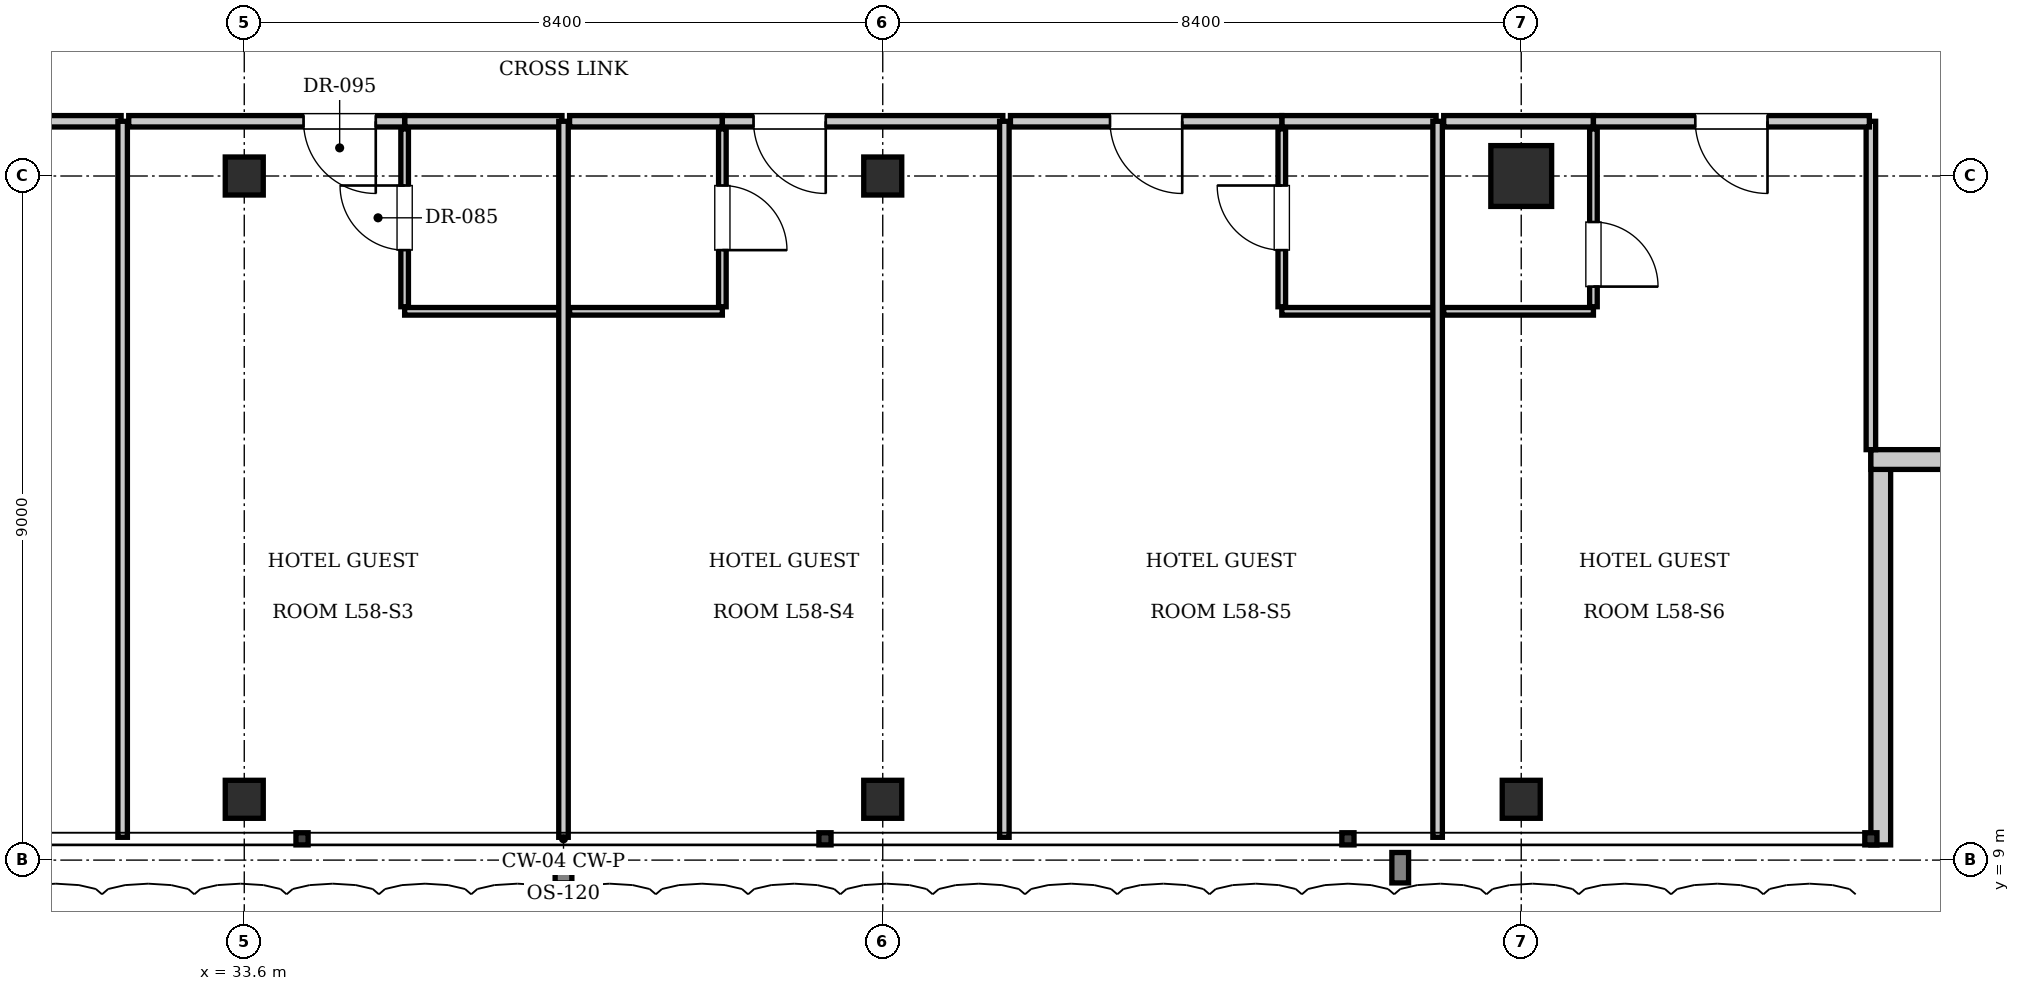
"""IFC4 building model, lengths in metres.
Left out: names, types, materials, properties, quantities, classifications, styles, units other than length and angle.
Written with IfcOpenShell. Run it as: python <this file> out.ifc"""

import sys

from ifc_helpers import new_model, si_unit, direction, frame, frame_2d, origin, origin_2d, place, context, subcontext, project, spatial, rectangle, i_section, extrude, element, fill, save


model = new_model("IFC4")
c1 = context("Model", 3, precision=1e-05, world=origin(), true_north=direction((0.0, 1.0)))
c2 = subcontext(c1, "Body", "Model", "MODEL_VIEW")
j1 = project(units=[si_unit("LENGTHUNIT", "METRE"), si_unit("PLANEANGLEUNIT", "RADIAN")], contexts=[c1])
p1 = place(None, origin())
s1 = spatial("IfcSite", under=j1, at=p1, CompositionType="ELEMENT")
p2 = place(p1, origin())
s2 = spatial("IfcBuilding", under=s1, at=p2, CompositionType="ELEMENT")
p3 = place(p2, frame((0.0, 0.0, 239.4)))
s3 = spatial("IfcBuildingStorey", under=s2, at=p3, CompositionType="ELEMENT", Elevation=239.4)
p4 = place(p3, frame((50.4, 18.0, 0.0), z_axis=(0.0, 0.0, 1.0), x_axis=(1.0, 0.0, 0.0)))
e1 = element("IfcColumn", 1, at=p4, inside=s3, PredefinedType="COLUMN", context=c2, shape_type="SweptSolid", body=[
    extrude(rectangle(XDim=0.8, YDim=0.8, at=origin_2d()), origin(), (0.0, 0.0, 1.0), 3.85),
])
for number, where, z_axis, x_axis in (
    (2, (33.6, 18.0, 0.0), (0.0, 0.0, 1.0), (1.0, 0.0, 0.0)),
    (3, (42.0, 18.0, 0.0), (0.0, 0.0, 1.0), (1.0, 0.0, 0.0)),
    (4, (33.6, 9.8, 0.0), (0.0, 0.0, 1.0), (1.0, 0.0, 0.0)),
    (5, (42.0, 9.8, 0.0), (0.0, 0.0, 1.0), (1.0, 0.0, 0.0)),
    (6, (50.4, 9.8, 0.0), (0.0, 0.0, 1.0), (1.0, 0.0, 0.0)),
):
    element("IfcColumn", number, at=place(p3, frame(where, z_axis=z_axis, x_axis=x_axis)), inside=s3, PredefinedType="COLUMN", context=c2, shape_type="SweptSolid", body=[
        extrude(i_section(OverallWidth=0.5, OverallDepth=0.5, WebThickness=0.022, FlangeThickness=0.032, at=origin_2d()), origin(), (0.0, 0.0, 1.0), 3.85),
    ])
p5 = place(p3, frame((55.13, 14.4, 0.0), z_axis=(0.0, 0.0, 1.0), x_axis=(0.0, -1.0, 0.0)))
e7 = element("IfcWall", 7, at=p5, inside=s3, PredefinedType="SOLIDWALL", context=c2, shape_type="SweptSolid", body=[
    extrude(rectangle(XDim=5.2, YDim=0.26, at=frame_2d((2.6, 0.0))), origin(), (0.0, 0.0, 1.0), 3.61),
])
p6 = place(p3, frame((60.2, 14.27, 0.0), z_axis=(0.0, 0.0, 1.0), x_axis=(-1.0, 0.0, 0.0)))
e8 = element("IfcWall", 8, at=p6, inside=s3, PredefinedType="SOLIDWALL", context=c2, shape_type="SweptSolid", body=[
    extrude(rectangle(XDim=5.2, YDim=0.26, at=frame_2d((2.6, 0.0))), origin(), (0.0, 0.0, 1.0), 3.61),
])
p7 = place(p6, frame((1.6, 0.0, 0.9)))
e9 = element("IfcOpeningElement", 9, at=p7, cuts=e8, PredefinedType="OPENING", context=c2, shape_type="SweptSolid", body=[
    extrude(rectangle(XDim=2.0, YDim=2.2, at=frame_2d((1.0, 1.1))), frame((0.0, 0.14, 0.0), z_axis=(0.0, -1.0, 0.0), x_axis=(1.0, 0.0, 0.0)), (0.0, 0.0, 1.0), 0.28),
])
p8 = place(p3, frame((55.0, 14.4, 0.0), z_axis=(0.0, 0.0, 1.0), x_axis=(0.0, 1.0, 0.0)))
e10 = element("IfcWall", 10, at=p8, inside=s3, PredefinedType="PARTITIONING", context=c2, shape_type="SweptSolid", body=[
    extrude(rectangle(XDim=4.32, YDim=0.125, at=frame_2d((2.16, 0.0))), origin(), (0.0, 0.0, 1.0), 3.61),
])
p9 = place(p3, frame((28.35, 18.72, 0.0), z_axis=(0.0, 0.0, 1.0), x_axis=(1.0, 0.0, 0.0)))
e11 = element("IfcWall", 11, at=p9, inside=s3, PredefinedType="PARTITIONING", context=c2, shape_type="SweptSolid", body=[
    extrude(rectangle(XDim=3.63, YDim=0.15, at=frame_2d((1.815, 0.0))), origin(), (0.0, 0.0, 1.0), 3.61),
])
p10 = place(p9, frame((1.34, 0.0, 0.0)))
e12 = element("IfcOpeningElement", 12, at=p10, cuts=e11, PredefinedType="OPENING", context=c2, shape_type="SweptSolid", body=[
    extrude(rectangle(XDim=0.95, YDim=2.15, at=frame_2d((0.475, 1.075))), frame((0.0, 0.085, 0.0), z_axis=(0.0, -1.0, 0.0), x_axis=(1.0, 0.0, 0.0)), (0.0, 0.0, 1.0), 0.17),
])
p11 = place(p3, frame((32.0, 9.3, 0.0), z_axis=(0.0, 0.0, 1.0), x_axis=(0.0, 1.0, 0.0)))
e13 = element("IfcWall", 13, at=p11, inside=s3, PredefinedType="PARTITIONING", context=c2, shape_type="SweptSolid", body=[
    extrude(rectangle(XDim=9.42, YDim=0.125, at=frame_2d((4.71, 0.0))), origin(), (0.0, 0.0, 1.0), 3.61),
])
p12 = place(p3, frame((35.71, 18.72, 0.0), z_axis=(0.0, 0.0, 1.0), x_axis=(1.0, 0.0, 0.0)))
e14 = element("IfcWall", 14, at=p12, inside=s3, PredefinedType="PARTITIONING", context=c2, shape_type="SweptSolid", body=[
    extrude(rectangle(XDim=2.07, YDim=0.15, at=frame_2d((1.035, 0.0))), origin(), (0.0, 0.0, 1.0), 3.61),
])
p13 = place(p3, frame((35.71, 16.22, 0.0), z_axis=(0.0, 0.0, 1.0), x_axis=(1.0, 0.0, 0.0)))
e15 = element("IfcWall", 15, at=p13, inside=s3, PredefinedType="PARTITIONING", context=c2, shape_type="SweptSolid", body=[
    extrude(rectangle(XDim=2.05, YDim=0.1, at=frame_2d((1.025, 0.0))), origin(), (0.0, 0.0, 1.0), 3.61),
])
p14 = place(p3, frame((35.71, 16.28, 0.0), z_axis=(0.0, 0.0, 1.0), x_axis=(0.0, 1.0, 0.0)))
e16 = element("IfcWall", 16, at=p14, inside=s3, PredefinedType="PARTITIONING", context=c2, shape_type="SweptSolid", body=[
    extrude(rectangle(XDim=2.34, YDim=0.1, at=frame_2d((1.17, 0.0))), origin(), (0.0, 0.0, 1.0), 3.61),
])
p15 = place(p14, frame((0.745, 0.0, 0.0)))
e17 = element("IfcOpeningElement", 17, at=p15, cuts=e16, PredefinedType="OPENING", context=c2, shape_type="SweptSolid", body=[
    extrude(rectangle(XDim=0.85, YDim=2.1, at=frame_2d((0.425, 1.05))), frame((0.0, 0.06, 0.0), z_axis=(0.0, -1.0, 0.0), x_axis=(1.0, 0.0, 0.0)), (0.0, 0.0, 1.0), 0.12),
])
p16 = place(p3, frame((32.08, 18.72, 0.0), z_axis=(0.0, 0.0, 1.0), x_axis=(1.0, 0.0, 0.0)))
e18 = element("IfcWall", 18, at=p16, inside=s3, PredefinedType="PARTITIONING", context=c2, shape_type="SweptSolid", body=[
    extrude(rectangle(XDim=3.63, YDim=0.15, at=frame_2d((1.815, 0.0))), origin(), (0.0, 0.0, 1.0), 3.61),
])
p17 = place(p16, frame((2.3, 0.0, 0.0)))
e19 = element("IfcOpeningElement", 19, at=p17, cuts=e18, PredefinedType="OPENING", context=c2, shape_type="SweptSolid", body=[
    extrude(rectangle(XDim=0.95, YDim=2.15, at=frame_2d((0.475, 1.075))), frame((0.0, 0.085, 0.0), z_axis=(0.0, -1.0, 0.0), x_axis=(1.0, 0.0, 0.0)), (0.0, 0.0, 1.0), 0.17),
])
p18 = place(p3, frame((37.8, 9.3, 0.0), z_axis=(0.0, 0.0, 1.0), x_axis=(0.0, 1.0, 0.0)))
e20 = element("IfcWall", 20, at=p18, inside=s3, PredefinedType="PARTITIONING", context=c2, shape_type="SweptSolid", body=[
    extrude(rectangle(XDim=9.42, YDim=0.125, at=frame_2d((4.71, 0.0))), origin(), (0.0, 0.0, 1.0), 3.293),
])
p19 = place(p3, frame((37.88, 18.72, 0.0), z_axis=(0.0, 0.0, 1.0), x_axis=(1.0, 0.0, 0.0)))
e21 = element("IfcWall", 21, at=p19, inside=s3, PredefinedType="PARTITIONING", context=c2, shape_type="SweptSolid", body=[
    extrude(rectangle(XDim=2.01, YDim=0.15, at=frame_2d((1.005, 0.0))), origin(), (0.0, 0.0, 1.0), 3.61),
])
p20 = place(p3, frame((37.88, 16.22, 0.0), z_axis=(0.0, 0.0, 1.0), x_axis=(1.0, 0.0, 0.0)))
e22 = element("IfcWall", 22, at=p20, inside=s3, PredefinedType="PARTITIONING", context=c2, shape_type="SweptSolid", body=[
    extrude(rectangle(XDim=2.01, YDim=0.1, at=frame_2d((1.005, 0.0))), origin(), (0.0, 0.0, 1.0), 3.61),
])
p21 = place(p3, frame((39.89, 16.28, 0.0), z_axis=(0.0, 0.0, 1.0), x_axis=(0.0, 1.0, 0.0)))
e23 = element("IfcWall", 23, at=p21, inside=s3, PredefinedType="PARTITIONING", context=c2, shape_type="SweptSolid", body=[
    extrude(rectangle(XDim=2.34, YDim=0.1, at=frame_2d((1.17, 0.0))), origin(), (0.0, 0.0, 1.0), 3.61),
])
p22 = place(p21, frame((0.745, 0.0, 0.0)))
e24 = element("IfcOpeningElement", 24, at=p22, cuts=e23, PredefinedType="OPENING", context=c2, shape_type="SweptSolid", body=[
    extrude(rectangle(XDim=0.85, YDim=2.1, at=frame_2d((0.425, 1.05))), frame((0.0, 0.06, 0.0), z_axis=(0.0, -1.0, 0.0), x_axis=(1.0, 0.0, 0.0)), (0.0, 0.0, 1.0), 0.12),
])
p23 = place(p3, frame((39.89, 18.72, 0.0), z_axis=(0.0, 0.0, 1.0), x_axis=(1.0, 0.0, 0.0)))
e25 = element("IfcWall", 25, at=p23, inside=s3, PredefinedType="PARTITIONING", context=c2, shape_type="SweptSolid", body=[
    extrude(rectangle(XDim=3.69, YDim=0.15, at=frame_2d((1.845, 0.0))), origin(), (0.0, 0.0, 1.0), 3.61),
])
p24 = place(p23, frame((0.41, 0.0, 0.0)))
e26 = element("IfcOpeningElement", 26, at=p24, cuts=e25, PredefinedType="OPENING", context=c2, shape_type="SweptSolid", body=[
    extrude(rectangle(XDim=0.95, YDim=2.15, at=frame_2d((0.475, 1.075))), frame((0.0, 0.085, 0.0), z_axis=(0.0, -1.0, 0.0), x_axis=(1.0, 0.0, 0.0)), (0.0, 0.0, 1.0), 0.17),
])
p25 = place(p3, frame((43.6, 9.3, 0.0), z_axis=(0.0, 0.0, 1.0), x_axis=(0.0, 1.0, 0.0)))
e27 = element("IfcWall", 27, at=p25, inside=s3, PredefinedType="PARTITIONING", context=c2, shape_type="SweptSolid", body=[
    extrude(rectangle(XDim=9.42, YDim=0.125, at=frame_2d((4.71, 0.0))), origin(), (0.0, 0.0, 1.0), 3.61),
])
p26 = place(p3, frame((47.25, 18.72, 0.0), z_axis=(0.0, 0.0, 1.0), x_axis=(1.0, 0.0, 0.0)))
e28 = element("IfcWall", 28, at=p26, inside=s3, PredefinedType="PARTITIONING", context=c2, shape_type="SweptSolid", body=[
    extrude(rectangle(XDim=2.03, YDim=0.15, at=frame_2d((1.015, 0.0))), origin(), (0.0, 0.0, 1.0), 3.61),
])
p27 = place(p3, frame((47.25, 16.22, 0.0), z_axis=(0.0, 0.0, 1.0), x_axis=(1.0, 0.0, 0.0)))
e29 = element("IfcWall", 29, at=p27, inside=s3, PredefinedType="PARTITIONING", context=c2, shape_type="SweptSolid", body=[
    extrude(rectangle(XDim=2.01, YDim=0.1, at=frame_2d((1.005, 0.0))), origin(), (0.0, 0.0, 1.0), 3.61),
])
p28 = place(p3, frame((47.25, 16.28, 0.0), z_axis=(0.0, 0.0, 1.0), x_axis=(0.0, 1.0, 0.0)))
e30 = element("IfcWall", 30, at=p28, inside=s3, PredefinedType="PARTITIONING", context=c2, shape_type="SweptSolid", body=[
    extrude(rectangle(XDim=2.34, YDim=0.1, at=frame_2d((1.17, 0.0))), origin(), (0.0, 0.0, 1.0), 3.61),
])
p29 = place(p28, frame((0.745, 0.0, 0.0)))
e31 = element("IfcOpeningElement", 31, at=p29, cuts=e30, PredefinedType="OPENING", context=c2, shape_type="SweptSolid", body=[
    extrude(rectangle(XDim=0.85, YDim=2.1, at=frame_2d((0.425, 1.05))), frame((0.0, 0.06, 0.0), z_axis=(0.0, -1.0, 0.0), x_axis=(1.0, 0.0, 0.0)), (0.0, 0.0, 1.0), 0.12),
])
p30 = place(p3, frame((43.68, 18.72, 0.0), z_axis=(0.0, 0.0, 1.0), x_axis=(1.0, 0.0, 0.0)))
e32 = element("IfcWall", 32, at=p30, inside=s3, PredefinedType="PARTITIONING", context=c2, shape_type="SweptSolid", body=[
    extrude(rectangle(XDim=3.57, YDim=0.15, at=frame_2d((1.785, 0.0))), origin(), (0.0, 0.0, 1.0), 3.61),
])
p31 = place(p30, frame((1.31, 0.0, 0.0)))
e33 = element("IfcOpeningElement", 33, at=p31, cuts=e32, PredefinedType="OPENING", context=c2, shape_type="SweptSolid", body=[
    extrude(rectangle(XDim=0.95, YDim=2.15, at=frame_2d((0.475, 1.075))), frame((0.0, 0.085, 0.0), z_axis=(0.0, -1.0, 0.0), x_axis=(1.0, 0.0, 0.0)), (0.0, 0.0, 1.0), 0.17),
])
p32 = place(p3, frame((49.3, 9.3, 0.0), z_axis=(0.0, 0.0, 1.0), x_axis=(0.0, 1.0, 0.0)))
e34 = element("IfcWall", 34, at=p32, inside=s3, PredefinedType="PARTITIONING", context=c2, shape_type="SweptSolid", body=[
    extrude(rectangle(XDim=9.42, YDim=0.125, at=frame_2d((4.71, 0.0))), origin(), (0.0, 0.0, 1.0), 3.61),
])
p33 = place(p3, frame((49.38, 18.72, 0.0), z_axis=(0.0, 0.0, 1.0), x_axis=(1.0, 0.0, 0.0)))
e35 = element("IfcWall", 35, at=p33, inside=s3, PredefinedType="PARTITIONING", context=c2, shape_type="SweptSolid", body=[
    extrude(rectangle(XDim=1.97, YDim=0.15, at=frame_2d((0.985, 0.0))), origin(), (0.0, 0.0, 1.0), 3.61),
])
p34 = place(p3, frame((49.38, 16.22, 0.0), z_axis=(0.0, 0.0, 1.0), x_axis=(1.0, 0.0, 0.0)))
e36 = element("IfcWall", 36, at=p34, inside=s3, PredefinedType="PARTITIONING", context=c2, shape_type="SweptSolid", body=[
    extrude(rectangle(XDim=1.97, YDim=0.1, at=frame_2d((0.985, 0.0))), origin(), (0.0, 0.0, 1.0), 3.61),
])
p35 = place(p3, frame((51.35, 16.28, 0.0), z_axis=(0.0, 0.0, 1.0), x_axis=(0.0, 1.0, 0.0)))
e37 = element("IfcWall", 37, at=p35, inside=s3, PredefinedType="PARTITIONING", context=c2, shape_type="SweptSolid", body=[
    extrude(rectangle(XDim=2.34, YDim=0.1, at=frame_2d((1.17, 0.0))), origin(), (0.0, 0.0, 1.0), 3.61),
])
p36 = place(p35, frame((0.265, 0.0, 0.0)))
e38 = element("IfcOpeningElement", 38, at=p36, cuts=e37, PredefinedType="OPENING", context=c2, shape_type="SweptSolid", body=[
    extrude(rectangle(XDim=0.85, YDim=2.1, at=frame_2d((0.425, 1.05))), frame((0.0, 0.06, 0.0), z_axis=(0.0, -1.0, 0.0), x_axis=(1.0, 0.0, 0.0)), (0.0, 0.0, 1.0), 0.12),
])
p37 = place(p3, frame((51.35, 18.72, 0.0), z_axis=(0.0, 0.0, 1.0), x_axis=(1.0, 0.0, 0.0)))
e39 = element("IfcWall", 39, at=p37, inside=s3, PredefinedType="PARTITIONING", context=c2, shape_type="SweptSolid", body=[
    extrude(rectangle(XDim=3.63, YDim=0.15, at=frame_2d((1.815, 0.0))), origin(), (0.0, 0.0, 1.0), 3.61),
])
p38 = place(p37, frame((1.34, 0.0, 0.0)))
e40 = element("IfcOpeningElement", 40, at=p38, cuts=e39, PredefinedType="OPENING", context=c2, shape_type="SweptSolid", body=[
    extrude(rectangle(XDim=0.95, YDim=2.15, at=frame_2d((0.475, 1.075))), frame((0.0, 0.085, 0.0), z_axis=(0.0, -1.0, 0.0), x_axis=(1.0, 0.0, 0.0)), (0.0, 0.0, 1.0), 0.17),
])
p39 = place(p15, origin())
e41 = element("IfcDoor", 41, at=p39, inside=s3, OperationType="SINGLE_SWING_RIGHT", PredefinedType="DOOR", context=c2, shape_type="SweptSolid", body=[
    extrude(rectangle(XDim=0.85, YDim=2.1, at=frame_2d((0.425, 1.05))), frame((0.0, 0.025, 0.0), z_axis=(0.0, -1.0, 0.0), x_axis=(1.0, 0.0, 0.0)), (0.0, 0.0, 1.0), 0.05),
])
fill(e17, e41)
p40 = place(p17, frame((0.95, 0.0, 0.0), z_axis=(0.0, 0.0, 1.0), x_axis=(-1.0, 0.0, 0.0)))
e42 = element("IfcDoor", 42, at=p40, inside=s3, OperationType="SINGLE_SWING_LEFT", PredefinedType="DOOR", context=c2, shape_type="SweptSolid", body=[
    extrude(rectangle(XDim=0.95, YDim=2.15, at=frame_2d((0.475, 1.075))), frame((0.0, 0.025, 0.0), z_axis=(0.0, -1.0, 0.0), x_axis=(1.0, 0.0, 0.0)), (0.0, 0.0, 1.0), 0.05),
])
fill(e19, e42)
p41 = place(p22, frame((0.85, 0.0, 0.0), z_axis=(0.0, 0.0, 1.0), x_axis=(-1.0, 0.0, 0.0)))
e43 = element("IfcDoor", 43, at=p41, inside=s3, OperationType="SINGLE_SWING_RIGHT", PredefinedType="DOOR", context=c2, shape_type="SweptSolid", body=[
    extrude(rectangle(XDim=0.85, YDim=2.1, at=frame_2d((0.425, 1.05))), frame((0.0, 0.025, 0.0), z_axis=(0.0, -1.0, 0.0), x_axis=(1.0, 0.0, 0.0)), (0.0, 0.0, 1.0), 0.05),
])
fill(e24, e43)
p42 = place(p24, frame((0.95, 0.0, 0.0), z_axis=(0.0, 0.0, 1.0), x_axis=(-1.0, 0.0, 0.0)))
e44 = element("IfcDoor", 44, at=p42, inside=s3, OperationType="SINGLE_SWING_LEFT", PredefinedType="DOOR", context=c2, shape_type="SweptSolid", body=[
    extrude(rectangle(XDim=0.95, YDim=2.15, at=frame_2d((0.475, 1.075))), frame((0.0, 0.025, 0.0), z_axis=(0.0, -1.0, 0.0), x_axis=(1.0, 0.0, 0.0)), (0.0, 0.0, 1.0), 0.05),
])
fill(e26, e44)
p43 = place(p29, origin())
e45 = element("IfcDoor", 45, at=p43, inside=s3, OperationType="SINGLE_SWING_RIGHT", PredefinedType="DOOR", context=c2, shape_type="SweptSolid", body=[
    extrude(rectangle(XDim=0.85, YDim=2.1, at=frame_2d((0.425, 1.05))), frame((0.0, 0.025, 0.0), z_axis=(0.0, -1.0, 0.0), x_axis=(1.0, 0.0, 0.0)), (0.0, 0.0, 1.0), 0.05),
])
fill(e31, e45)
p44 = place(p31, frame((0.95, 0.0, 0.0), z_axis=(0.0, 0.0, 1.0), x_axis=(-1.0, 0.0, 0.0)))
e46 = element("IfcDoor", 46, at=p44, inside=s3, OperationType="SINGLE_SWING_LEFT", PredefinedType="DOOR", context=c2, shape_type="SweptSolid", body=[
    extrude(rectangle(XDim=0.95, YDim=2.15, at=frame_2d((0.475, 1.075))), frame((0.0, 0.025, 0.0), z_axis=(0.0, -1.0, 0.0), x_axis=(1.0, 0.0, 0.0)), (0.0, 0.0, 1.0), 0.05),
])
fill(e33, e46)
p45 = place(p36, frame((0.85, 0.0, 0.0), z_axis=(0.0, 0.0, 1.0), x_axis=(-1.0, 0.0, 0.0)))
e47 = element("IfcDoor", 47, at=p45, inside=s3, OperationType="SINGLE_SWING_RIGHT", PredefinedType="DOOR", context=c2, shape_type="SweptSolid", body=[
    extrude(rectangle(XDim=0.85, YDim=2.1, at=frame_2d((0.425, 1.05))), frame((0.0, 0.025, 0.0), z_axis=(0.0, -1.0, 0.0), x_axis=(1.0, 0.0, 0.0)), (0.0, 0.0, 1.0), 0.05),
])
fill(e38, e47)
p46 = place(p38, frame((0.95, 0.0, 0.0), z_axis=(0.0, 0.0, 1.0), x_axis=(-1.0, 0.0, 0.0)))
e48 = element("IfcDoor", 48, at=p46, inside=s3, OperationType="SINGLE_SWING_LEFT", PredefinedType="DOOR", context=c2, shape_type="SweptSolid", body=[
    extrude(rectangle(XDim=0.95, YDim=2.15, at=frame_2d((0.475, 1.075))), frame((0.0, 0.025, 0.0), z_axis=(0.0, -1.0, 0.0), x_axis=(1.0, 0.0, 0.0)), (0.0, 0.0, 1.0), 0.05),
])
fill(e40, e48)
save(model, sys.argv[1])
